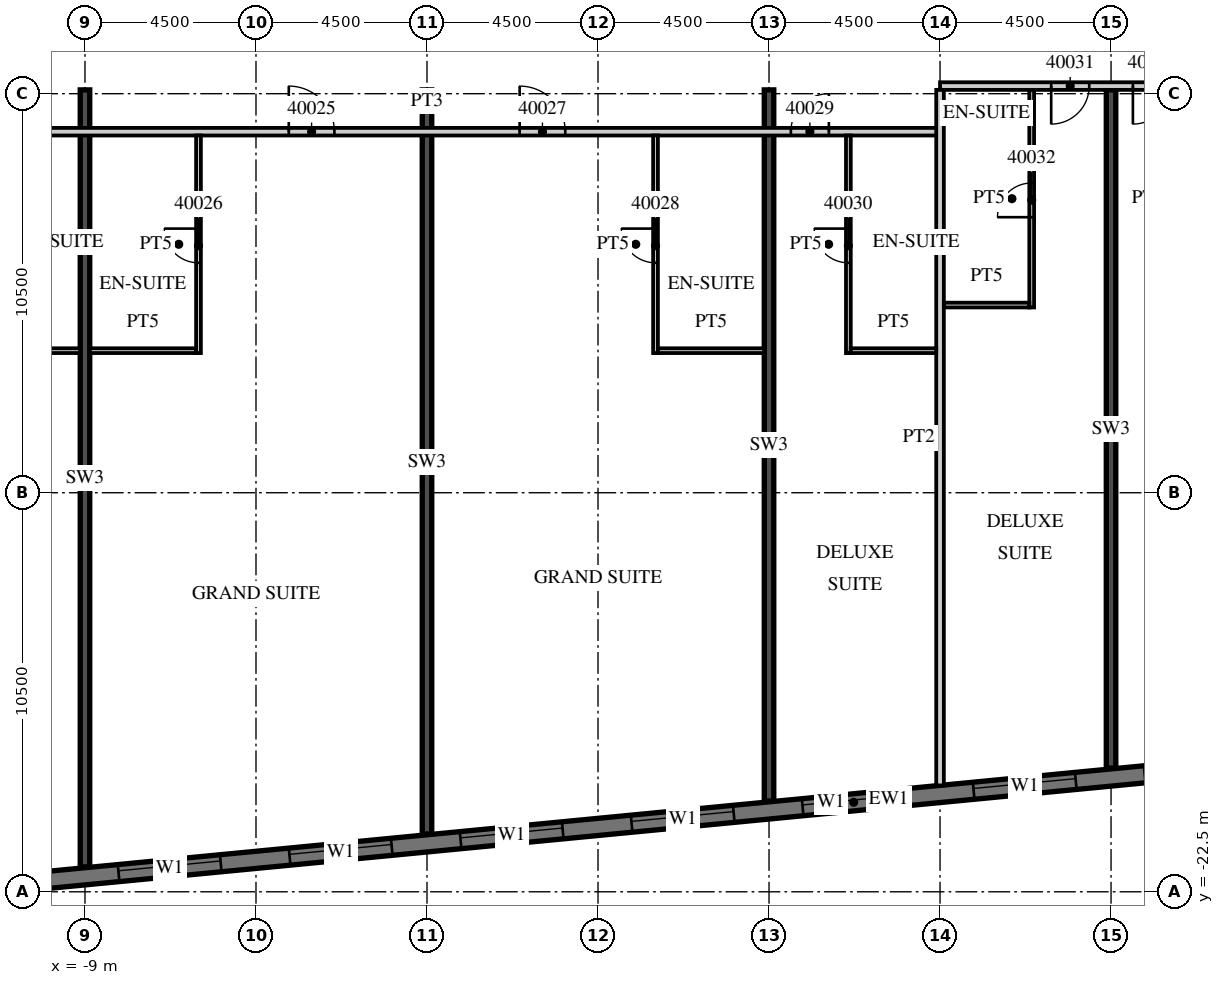
"""IFC4 building model, lengths in metres.
Left out: names, types, materials, properties, quantities, classifications, styles, units other than length and angle.
Written with IfcOpenShell. Run it as: python <this file> out.ifc"""

import sys

from ifc_helpers import new_model, si_unit, direction, frame, frame_2d, origin, place, context, subcontext, project, spatial, rectangle, extrude, element, fill, save


model = new_model("IFC4")
c1 = context("Model", 3, precision=1e-05, world=origin(), true_north=direction((0.0, 1.0)))
c2 = subcontext(c1, "Body", "Model", "MODEL_VIEW")
j1 = project(units=[si_unit("LENGTHUNIT", "METRE"), si_unit("PLANEANGLEUNIT", "RADIAN")], contexts=[c1])
p1 = place(None, origin())
s1 = spatial("IfcSite", under=j1, at=p1, CompositionType="ELEMENT")
p2 = place(p1, origin())
s2 = spatial("IfcBuilding", under=s1, at=p2, CompositionType="ELEMENT")
p3 = place(p2, frame((0.0, 0.0, 173.5)))
s3 = spatial("IfcBuildingStorey", under=s2, at=p3, CompositionType="ELEMENT", Elevation=173.5)
p4 = place(p3, frame((-9.0, -21.845, 0.0), z_axis=(0.0, 0.0, 1.0), x_axis=(0.0, 1.0, 0.0)))
e1 = element("IfcWall", 1, at=p4, inside=s3, PredefinedType="SHEAR", context=c2, shape_type="SweptSolid", body=[
    extrude(rectangle(XDim=20.445, YDim=0.25, at=frame_2d((10.223, 0.0))), origin(), (0.0, 0.0, 1.0), 3.3),
])
p5 = place(p3, frame((0.0, -20.979, 0.0), z_axis=(0.0, 0.0, 1.0), x_axis=(0.0, 1.0, 0.0)))
e2 = element("IfcWall", 2, at=p5, inside=s3, PredefinedType="SHEAR", context=c2, shape_type="SweptSolid", body=[
    extrude(rectangle(XDim=19.579, YDim=0.25, at=frame_2d((9.789, 0.0))), origin(), (0.0, 0.0, 1.0), 3.3),
])
p6 = place(p3, frame((9.0, -20.112, 0.0), z_axis=(0.0, 0.0, 1.0), x_axis=(0.0, 1.0, 0.0)))
e3 = element("IfcWall", 3, at=p6, inside=s3, PredefinedType="SHEAR", context=c2, shape_type="SweptSolid", body=[
    extrude(rectangle(XDim=18.712, YDim=0.25, at=frame_2d((9.356, 0.0))), origin(), (0.0, 0.0, 1.0), 3.3),
])
p7 = place(p3, frame((18.0, -19.245, 0.0), z_axis=(0.0, 0.0, 1.0), x_axis=(0.0, 1.0, 0.0)))
e4 = element("IfcWall", 4, at=p7, inside=s3, PredefinedType="SHEAR", context=c2, shape_type="SweptSolid", body=[
    extrude(rectangle(XDim=17.845, YDim=0.25, at=frame_2d((8.923, 0.0))), origin(), (0.0, 0.0, 1.0), 3.3),
])
p8 = place(p3, frame((-13.521, -22.529, 0.0), z_axis=(0.0, 0.0, 1.0), x_axis=(0.995396436651, 0.095843277819, 0.0)))
e5 = element("IfcWall", 5, at=p8, inside=s3, PredefinedType="SOLIDWALL", context=c2, shape_type="SweptSolid", body=[
    extrude(rectangle(XDim=51.578, YDim=0.45, at=frame_2d((25.789, 0.0))), origin(), (0.0, 0.0, 1.0), 3.02),
])
p9 = place(p8, frame((0.91, 0.0, 0.45)))
e6 = element("IfcOpeningElement", 6, at=p9, cuts=e5, PredefinedType="OPENING", context=c2, shape_type="SweptSolid", body=[
    extrude(rectangle(XDim=2.7, YDim=2.25, at=frame_2d((1.35, 1.125))), frame((0.0, 0.235, 0.0), z_axis=(0.0, -1.0, 0.0), x_axis=(1.0, 0.0, 0.0)), (0.0, 0.0, 1.0), 0.47),
])
p10 = place(p8, frame((5.431, 0.0, 0.45)))
e7 = element("IfcOpeningElement", 7, at=p10, cuts=e5, PredefinedType="OPENING", context=c2, shape_type="SweptSolid", body=[
    extrude(rectangle(XDim=2.7, YDim=2.25, at=frame_2d((1.35, 1.125))), frame((0.0, 0.235, 0.0), z_axis=(0.0, -1.0, 0.0), x_axis=(1.0, 0.0, 0.0)), (0.0, 0.0, 1.0), 0.47),
])
p11 = place(p8, frame((9.952, 0.0, 0.45)))
e8 = element("IfcOpeningElement", 8, at=p11, cuts=e5, PredefinedType="OPENING", context=c2, shape_type="SweptSolid", body=[
    extrude(rectangle(XDim=2.7, YDim=2.25, at=frame_2d((1.35, 1.125))), frame((0.0, 0.235, 0.0), z_axis=(0.0, -1.0, 0.0), x_axis=(1.0, 0.0, 0.0)), (0.0, 0.0, 1.0), 0.47),
])
p12 = place(p8, frame((14.473, 0.0, 0.45)))
e9 = element("IfcOpeningElement", 9, at=p12, cuts=e5, PredefinedType="OPENING", context=c2, shape_type="SweptSolid", body=[
    extrude(rectangle(XDim=2.7, YDim=2.25, at=frame_2d((1.35, 1.125))), frame((0.0, 0.235, 0.0), z_axis=(0.0, -1.0, 0.0), x_axis=(1.0, 0.0, 0.0)), (0.0, 0.0, 1.0), 0.47),
])
p13 = place(p8, frame((18.994, 0.0, 0.45)))
e10 = element("IfcOpeningElement", 10, at=p13, cuts=e5, PredefinedType="OPENING", context=c2, shape_type="SweptSolid", body=[
    extrude(rectangle(XDim=2.7, YDim=2.25, at=frame_2d((1.35, 1.125))), frame((0.0, 0.235, 0.0), z_axis=(0.0, -1.0, 0.0), x_axis=(1.0, 0.0, 0.0)), (0.0, 0.0, 1.0), 0.47),
])
p14 = place(p8, frame((23.514, 0.0, 0.45)))
e11 = element("IfcOpeningElement", 11, at=p14, cuts=e5, PredefinedType="OPENING", context=c2, shape_type="SweptSolid", body=[
    extrude(rectangle(XDim=2.7, YDim=2.25, at=frame_2d((1.35, 1.125))), frame((0.0, 0.235, 0.0), z_axis=(0.0, -1.0, 0.0), x_axis=(1.0, 0.0, 0.0)), (0.0, 0.0, 1.0), 0.47),
])
p15 = place(p8, frame((28.035, 0.0, 0.45)))
e12 = element("IfcOpeningElement", 12, at=p15, cuts=e5, PredefinedType="OPENING", context=c2, shape_type="SweptSolid", body=[
    extrude(rectangle(XDim=2.7, YDim=2.25, at=frame_2d((1.35, 1.125))), frame((0.0, 0.235, 0.0), z_axis=(0.0, -1.0, 0.0), x_axis=(1.0, 0.0, 0.0)), (0.0, 0.0, 1.0), 0.47),
])
p16 = place(p8, frame((32.556, 0.0, 0.45)))
e13 = element("IfcOpeningElement", 13, at=p16, cuts=e5, PredefinedType="OPENING", context=c2, shape_type="SweptSolid", body=[
    extrude(rectangle(XDim=2.7, YDim=2.25, at=frame_2d((1.35, 1.125))), frame((0.0, 0.235, 0.0), z_axis=(0.0, -1.0, 0.0), x_axis=(1.0, 0.0, 0.0)), (0.0, 0.0, 1.0), 0.47),
])
p17 = place(p8, frame((37.077, 0.0, 0.45)))
e14 = element("IfcOpeningElement", 14, at=p17, cuts=e5, PredefinedType="OPENING", context=c2, shape_type="SweptSolid", body=[
    extrude(rectangle(XDim=2.7, YDim=2.25, at=frame_2d((1.35, 1.125))), frame((0.0, 0.235, 0.0), z_axis=(0.0, -1.0, 0.0), x_axis=(1.0, 0.0, 0.0)), (0.0, 0.0, 1.0), 0.47),
])
p18 = place(p8, frame((41.598, 0.0, 0.45)))
e15 = element("IfcOpeningElement", 15, at=p18, cuts=e5, PredefinedType="OPENING", context=c2, shape_type="SweptSolid", body=[
    extrude(rectangle(XDim=2.7, YDim=2.25, at=frame_2d((1.35, 1.125))), frame((0.0, 0.235, 0.0), z_axis=(0.0, -1.0, 0.0), x_axis=(1.0, 0.0, 0.0)), (0.0, 0.0, 1.0), 0.47),
])
p19 = place(p8, frame((46.119, 0.0, 0.45)))
e16 = element("IfcOpeningElement", 16, at=p19, cuts=e5, PredefinedType="OPENING", context=c2, shape_type="SweptSolid", body=[
    extrude(rectangle(XDim=2.7, YDim=2.25, at=frame_2d((1.35, 1.125))), frame((0.0, 0.235, 0.0), z_axis=(0.0, -1.0, 0.0), x_axis=(1.0, 0.0, 0.0)), (0.0, 0.0, 1.0), 0.47),
])
p20 = place(p3, frame((-13.5, -2.5, 0.0), z_axis=(0.0, 0.0, 1.0), x_axis=(1.0, 0.0, 0.0)))
e17 = element("IfcWall", 17, at=p20, inside=s3, PredefinedType="PARTITIONING", context=c2, shape_type="SweptSolid", body=[
    extrude(rectangle(XDim=27.0, YDim=0.2, at=frame_2d((13.5, 0.0))), origin(), (0.0, 0.0, 1.0), 3.02),
])
p21 = place(p20, frame((0.575, 0.0, 0.0)))
e18 = element("IfcOpeningElement", 18, at=p21, cuts=e17, PredefinedType="OPENING", context=c2, shape_type="SweptSolid", body=[
    extrude(rectangle(XDim=1.0, YDim=2.1, at=frame_2d((0.5, 1.05))), frame((0.0, 0.11, 0.0), z_axis=(0.0, -1.0, 0.0), x_axis=(1.0, 0.0, 0.0)), (0.0, 0.0, 1.0), 0.22),
])
p22 = place(p20, frame((9.863, 0.0, 0.0)))
e19 = element("IfcOpeningElement", 19, at=p22, cuts=e17, PredefinedType="OPENING", context=c2, shape_type="SweptSolid", body=[
    extrude(rectangle(XDim=1.2, YDim=2.1, at=frame_2d((0.6, 1.05))), frame((0.0, 0.11, 0.0), z_axis=(0.0, -1.0, 0.0), x_axis=(1.0, 0.0, 0.0)), (0.0, 0.0, 1.0), 0.22),
])
p23 = place(p20, frame((15.938, 0.0, 0.0)))
e20 = element("IfcOpeningElement", 20, at=p23, cuts=e17, PredefinedType="OPENING", context=c2, shape_type="SweptSolid", body=[
    extrude(rectangle(XDim=1.2, YDim=2.1, at=frame_2d((0.6, 1.05))), frame((0.0, 0.11, 0.0), z_axis=(0.0, -1.0, 0.0), x_axis=(1.0, 0.0, 0.0)), (0.0, 0.0, 1.0), 0.22),
])
p24 = place(p20, frame((23.075, 0.0, 0.0)))
e21 = element("IfcOpeningElement", 21, at=p24, cuts=e17, PredefinedType="OPENING", context=c2, shape_type="SweptSolid", body=[
    extrude(rectangle(XDim=1.0, YDim=2.1, at=frame_2d((0.5, 1.05))), frame((0.0, 0.11, 0.0), z_axis=(0.0, -1.0, 0.0), x_axis=(1.0, 0.0, 0.0)), (0.0, 0.0, 1.0), 0.22),
])
p25 = place(p3, frame((13.5, -1.3, 0.0), z_axis=(0.0, 0.0, 1.0), x_axis=(1.0, 0.0, 0.0)))
e22 = element("IfcWall", 22, at=p25, inside=s3, PredefinedType="PARTITIONING", context=c2, shape_type="SweptSolid", body=[
    extrude(rectangle(XDim=26.317, YDim=0.2, at=frame_2d((13.158, 0.0))), origin(), (0.0, 0.0, 1.0), 3.02),
])
p26 = place(p25, frame((2.925, 0.0, 0.0)))
e23 = element("IfcOpeningElement", 23, at=p26, cuts=e22, PredefinedType="OPENING", context=c2, shape_type="SweptSolid", body=[
    extrude(rectangle(XDim=1.0, YDim=2.1, at=frame_2d((0.5, 1.05))), frame((0.0, 0.11, 0.0), z_axis=(0.0, -1.0, 0.0), x_axis=(1.0, 0.0, 0.0)), (0.0, 0.0, 1.0), 0.22),
])
p27 = place(p25, frame((5.075, 0.0, 0.0)))
e24 = element("IfcOpeningElement", 24, at=p27, cuts=e22, PredefinedType="OPENING", context=c2, shape_type="SweptSolid", body=[
    extrude(rectangle(XDim=1.0, YDim=2.1, at=frame_2d((0.5, 1.05))), frame((0.0, 0.11, 0.0), z_axis=(0.0, -1.0, 0.0), x_axis=(1.0, 0.0, 0.0)), (0.0, 0.0, 1.0), 0.22),
])
p28 = place(p25, frame((9.55, 0.0, 0.0)))
e25 = element("IfcOpeningElement", 25, at=p28, cuts=e22, PredefinedType="OPENING", context=c2, shape_type="SweptSolid", body=[
    extrude(rectangle(XDim=1.0, YDim=2.1, at=frame_2d((0.5, 1.05))), frame((0.0, 0.11, 0.0), z_axis=(0.0, -1.0, 0.0), x_axis=(1.0, 0.0, 0.0)), (0.0, 0.0, 1.0), 0.22),
])
p29 = place(p25, frame((18.862, 0.0, 0.0)))
e26 = element("IfcOpeningElement", 26, at=p29, cuts=e22, PredefinedType="OPENING", context=c2, shape_type="SweptSolid", body=[
    extrude(rectangle(XDim=1.2, YDim=2.1, at=frame_2d((0.6, 1.05))), frame((0.0, 0.11, 0.0), z_axis=(0.0, -1.0, 0.0), x_axis=(1.0, 0.0, 0.0)), (0.0, 0.0, 1.0), 0.22),
])
p30 = place(p25, frame((25.208, 0.0, 0.0)))
e27 = element("IfcOpeningElement", 27, at=p30, cuts=e22, PredefinedType="OPENING", context=c2, shape_type="SweptSolid", body=[
    extrude(rectangle(XDim=0.9, YDim=2.1, at=frame_2d((0.45, 1.05))), frame((0.0, 0.11, 0.0), z_axis=(0.0, -1.0, 0.0), x_axis=(1.0, 0.0, 0.0)), (0.0, 0.0, 1.0), 0.22),
])
p31 = place(p3, frame((-11.375, -8.262, 0.0), z_axis=(0.0, 0.0, 1.0), x_axis=(1.0, 0.0, 0.0)))
e28 = element("IfcWall", 28, at=p31, inside=s3, PredefinedType="PARTITIONING", context=c2, shape_type="SweptSolid", body=[
    extrude(rectangle(XDim=2.25, YDim=0.125, at=frame_2d((1.125, 0.0))), origin(), (0.0, 0.0, 1.0), 3.02),
])
p32 = place(p3, frame((-6.013, -8.325, 0.0), z_axis=(0.0, 0.0, 1.0), x_axis=(0.0, 1.0, 0.0)))
e29 = element("IfcWall", 29, at=p32, inside=s3, PredefinedType="PARTITIONING", context=c2, shape_type="SweptSolid", body=[
    extrude(rectangle(XDim=5.725, YDim=0.125, at=frame_2d((2.862, 0.0))), origin(), (0.0, 0.0, 1.0), 3.02),
])
p33 = place(p32, frame((2.375, 0.0, 0.0)))
e30 = element("IfcOpeningElement", 30, at=p33, cuts=e29, PredefinedType="OPENING", context=c2, shape_type="SweptSolid", body=[
    extrude(rectangle(XDim=0.9, YDim=2.1, at=frame_2d((0.45, 1.05))), frame((0.0, 0.073, 0.0), z_axis=(0.0, -1.0, 0.0), x_axis=(1.0, 0.0, 0.0)), (0.0, 0.0, 1.0), 0.145),
])
p34 = place(p3, frame((-8.875, -8.262, 0.0), z_axis=(0.0, 0.0, 1.0), x_axis=(1.0, 0.0, 0.0)))
e31 = element("IfcWall", 31, at=p34, inside=s3, PredefinedType="PARTITIONING", context=c2, shape_type="SweptSolid", body=[
    extrude(rectangle(XDim=2.8, YDim=0.125, at=frame_2d((1.4, 0.0))), origin(), (0.0, 0.0, 1.0), 3.02),
])
p35 = place(p3, frame((6.013, -8.325, 0.0), z_axis=(0.0, 0.0, 1.0), x_axis=(0.0, 1.0, 0.0)))
e32 = element("IfcWall", 32, at=p35, inside=s3, PredefinedType="PARTITIONING", context=c2, shape_type="SweptSolid", body=[
    extrude(rectangle(XDim=5.725, YDim=0.125, at=frame_2d((2.862, 0.0))), origin(), (0.0, 0.0, 1.0), 3.02),
])
p36 = place(p35, frame((2.375, 0.0, 0.0)))
e33 = element("IfcOpeningElement", 33, at=p36, cuts=e32, PredefinedType="OPENING", context=c2, shape_type="SweptSolid", body=[
    extrude(rectangle(XDim=0.9, YDim=2.1, at=frame_2d((0.45, 1.05))), frame((0.0, 0.073, 0.0), z_axis=(0.0, -1.0, 0.0), x_axis=(1.0, 0.0, 0.0)), (0.0, 0.0, 1.0), 0.145),
])
p37 = place(p3, frame((6.075, -8.262, 0.0), z_axis=(0.0, 0.0, 1.0), x_axis=(1.0, 0.0, 0.0)))
e34 = element("IfcWall", 34, at=p37, inside=s3, PredefinedType="PARTITIONING", context=c2, shape_type="SweptSolid", body=[
    extrude(rectangle(XDim=2.8, YDim=0.125, at=frame_2d((1.4, 0.0))), origin(), (0.0, 0.0, 1.0), 3.02),
])
p38 = place(p3, frame((13.5, -19.701, 0.0), z_axis=(0.0, 0.0, 1.0), x_axis=(0.0, 1.0, 0.0)))
e35 = element("IfcWall", 35, at=p38, inside=s3, PredefinedType="PARTITIONING", context=c2, shape_type="SweptSolid", body=[
    extrude(rectangle(XDim=18.301, YDim=0.2, at=frame_2d((9.15, 0.0))), origin(), (0.0, 0.0, 1.0), 3.02),
])
p39 = place(p3, frame((11.088, -8.325, 0.0), z_axis=(0.0, 0.0, 1.0), x_axis=(0.0, 1.0, 0.0)))
e36 = element("IfcWall", 36, at=p39, inside=s3, PredefinedType="PARTITIONING", context=c2, shape_type="SweptSolid", body=[
    extrude(rectangle(XDim=5.725, YDim=0.125, at=frame_2d((2.862, 0.0))), origin(), (0.0, 0.0, 1.0), 3.02),
])
p40 = place(p39, frame((2.375, 0.0, 0.0)))
e37 = element("IfcOpeningElement", 37, at=p40, cuts=e36, PredefinedType="OPENING", context=c2, shape_type="SweptSolid", body=[
    extrude(rectangle(XDim=0.9, YDim=2.1, at=frame_2d((0.45, 1.05))), frame((0.0, 0.073, 0.0), z_axis=(0.0, -1.0, 0.0), x_axis=(1.0, 0.0, 0.0)), (0.0, 0.0, 1.0), 0.145),
])
p41 = place(p3, frame((11.15, -8.262, 0.0), z_axis=(0.0, 0.0, 1.0), x_axis=(1.0, 0.0, 0.0)))
e38 = element("IfcWall", 38, at=p41, inside=s3, PredefinedType="PARTITIONING", context=c2, shape_type="SweptSolid", body=[
    extrude(rectangle(XDim=2.25, YDim=0.125, at=frame_2d((1.125, 0.0))), origin(), (0.0, 0.0, 1.0), 3.02),
])
p42 = place(p3, frame((15.912, -7.125, 0.0), z_axis=(0.0, 0.0, 1.0), x_axis=(0.0, 1.0, 0.0)))
e39 = element("IfcWall", 39, at=p42, inside=s3, PredefinedType="PARTITIONING", context=c2, shape_type="SweptSolid", body=[
    extrude(rectangle(XDim=5.725, YDim=0.125, at=frame_2d((2.863, 0.0))), origin(), (0.0, 0.0, 1.0), 3.02),
])
p43 = place(p42, frame((2.375, 0.0, 0.0)))
e40 = element("IfcOpeningElement", 40, at=p43, cuts=e39, PredefinedType="OPENING", context=c2, shape_type="SweptSolid", body=[
    extrude(rectangle(XDim=0.9, YDim=2.1, at=frame_2d((0.45, 1.05))), frame((0.0, 0.073, 0.0), z_axis=(0.0, -1.0, 0.0), x_axis=(1.0, 0.0, 0.0)), (0.0, 0.0, 1.0), 0.145),
])
p44 = place(p3, frame((13.6, -7.062, 0.0), z_axis=(0.0, 0.0, 1.0), x_axis=(1.0, 0.0, 0.0)))
e41 = element("IfcWall", 41, at=p44, inside=s3, PredefinedType="PARTITIONING", context=c2, shape_type="SweptSolid", body=[
    extrude(rectangle(XDim=2.25, YDim=0.125, at=frame_2d((1.125, 0.0))), origin(), (0.0, 0.0, 1.0), 3.02),
])
p45 = place(p10, origin())
e42 = element("IfcWindow", 42, at=p45, inside=s3, PartitioningType="SINGLE_PANEL", PredefinedType="WINDOW", context=c2, shape_type="SweptSolid", body=[
    extrude(rectangle(XDim=2.7, YDim=2.25, at=frame_2d((1.35, 1.125))), frame((0.0, 0.09, 0.0), z_axis=(0.0, -1.0, 0.0), x_axis=(1.0, 0.0, 0.0)), (0.0, 0.0, 1.0), 0.06),
])
fill(e7, e42)
p46 = place(p11, origin())
e43 = element("IfcWindow", 43, at=p46, inside=s3, PartitioningType="SINGLE_PANEL", PredefinedType="WINDOW", context=c2, shape_type="SweptSolid", body=[
    extrude(rectangle(XDim=2.7, YDim=2.25, at=frame_2d((1.35, 1.125))), frame((0.0, 0.09, 0.0), z_axis=(0.0, -1.0, 0.0), x_axis=(1.0, 0.0, 0.0)), (0.0, 0.0, 1.0), 0.06),
])
fill(e8, e43)
p47 = place(p12, origin())
e44 = element("IfcWindow", 44, at=p47, inside=s3, PartitioningType="SINGLE_PANEL", PredefinedType="WINDOW", context=c2, shape_type="SweptSolid", body=[
    extrude(rectangle(XDim=2.7, YDim=2.25, at=frame_2d((1.35, 1.125))), frame((0.0, 0.09, 0.0), z_axis=(0.0, -1.0, 0.0), x_axis=(1.0, 0.0, 0.0)), (0.0, 0.0, 1.0), 0.06),
])
fill(e9, e44)
p48 = place(p13, origin())
e45 = element("IfcWindow", 45, at=p48, inside=s3, PartitioningType="SINGLE_PANEL", PredefinedType="WINDOW", context=c2, shape_type="SweptSolid", body=[
    extrude(rectangle(XDim=2.7, YDim=2.25, at=frame_2d((1.35, 1.125))), frame((0.0, 0.09, 0.0), z_axis=(0.0, -1.0, 0.0), x_axis=(1.0, 0.0, 0.0)), (0.0, 0.0, 1.0), 0.06),
])
fill(e10, e45)
p49 = place(p14, origin())
e46 = element("IfcWindow", 46, at=p49, inside=s3, PartitioningType="SINGLE_PANEL", PredefinedType="WINDOW", context=c2, shape_type="SweptSolid", body=[
    extrude(rectangle(XDim=2.7, YDim=2.25, at=frame_2d((1.35, 1.125))), frame((0.0, 0.09, 0.0), z_axis=(0.0, -1.0, 0.0), x_axis=(1.0, 0.0, 0.0)), (0.0, 0.0, 1.0), 0.06),
])
fill(e11, e46)
p50 = place(p15, origin())
e47 = element("IfcWindow", 47, at=p50, inside=s3, PartitioningType="SINGLE_PANEL", PredefinedType="WINDOW", context=c2, shape_type="SweptSolid", body=[
    extrude(rectangle(XDim=2.7, YDim=2.25, at=frame_2d((1.35, 1.125))), frame((0.0, 0.09, 0.0), z_axis=(0.0, -1.0, 0.0), x_axis=(1.0, 0.0, 0.0)), (0.0, 0.0, 1.0), 0.06),
])
fill(e12, e47)
p51 = place(p22, origin())
e48 = element("IfcDoor", 48, at=p51, inside=s3, OperationType="SINGLE_SWING_LEFT", PredefinedType="DOOR", context=c2, shape_type="SweptSolid", body=[
    extrude(rectangle(XDim=1.2, YDim=2.1, at=frame_2d((0.6, 1.05))), frame((0.0, 0.025, 0.0), z_axis=(0.0, -1.0, 0.0), x_axis=(1.0, 0.0, 0.0)), (0.0, 0.0, 1.0), 0.05),
])
fill(e19, e48)
p52 = place(p33, origin())
e49 = element("IfcDoor", 49, at=p52, inside=s3, OperationType="SINGLE_SWING_RIGHT", PredefinedType="DOOR", context=c2, shape_type="SweptSolid", body=[
    extrude(rectangle(XDim=0.9, YDim=2.1, at=frame_2d((0.45, 1.05))), frame((0.0, 0.025, 0.0), z_axis=(0.0, -1.0, 0.0), x_axis=(1.0, 0.0, 0.0)), (0.0, 0.0, 1.0), 0.05),
])
fill(e30, e49)
p53 = place(p23, origin())
e50 = element("IfcDoor", 50, at=p53, inside=s3, OperationType="SINGLE_SWING_LEFT", PredefinedType="DOOR", context=c2, shape_type="SweptSolid", body=[
    extrude(rectangle(XDim=1.2, YDim=2.1, at=frame_2d((0.6, 1.05))), frame((0.0, 0.025, 0.0), z_axis=(0.0, -1.0, 0.0), x_axis=(1.0, 0.0, 0.0)), (0.0, 0.0, 1.0), 0.05),
])
fill(e20, e50)
p54 = place(p36, origin())
e51 = element("IfcDoor", 51, at=p54, inside=s3, OperationType="SINGLE_SWING_RIGHT", PredefinedType="DOOR", context=c2, shape_type="SweptSolid", body=[
    extrude(rectangle(XDim=0.9, YDim=2.1, at=frame_2d((0.45, 1.05))), frame((0.0, 0.025, 0.0), z_axis=(0.0, -1.0, 0.0), x_axis=(1.0, 0.0, 0.0)), (0.0, 0.0, 1.0), 0.05),
])
fill(e33, e51)
p55 = place(p24, origin())
e52 = element("IfcDoor", 52, at=p55, inside=s3, OperationType="SINGLE_SWING_RIGHT", PredefinedType="DOOR", context=c2, shape_type="SweptSolid", body=[
    extrude(rectangle(XDim=1.0, YDim=2.1, at=frame_2d((0.5, 1.05))), frame((0.0, 0.025, 0.0), z_axis=(0.0, -1.0, 0.0), x_axis=(1.0, 0.0, 0.0)), (0.0, 0.0, 1.0), 0.05),
])
fill(e21, e52)
p56 = place(p40, origin())
e53 = element("IfcDoor", 53, at=p56, inside=s3, OperationType="SINGLE_SWING_RIGHT", PredefinedType="DOOR", context=c2, shape_type="SweptSolid", body=[
    extrude(rectangle(XDim=0.9, YDim=2.1, at=frame_2d((0.45, 1.05))), frame((0.0, 0.025, 0.0), z_axis=(0.0, -1.0, 0.0), x_axis=(1.0, 0.0, 0.0)), (0.0, 0.0, 1.0), 0.05),
])
fill(e37, e53)
p57 = place(p26, origin())
e54 = element("IfcDoor", 54, at=p57, inside=s3, OperationType="SINGLE_SWING_LEFT", PredefinedType="DOOR", context=c2, shape_type="SweptSolid", body=[
    extrude(rectangle(XDim=1.0, YDim=2.1, at=frame_2d((0.5, 1.05))), frame((0.0, 0.025, 0.0), z_axis=(0.0, -1.0, 0.0), x_axis=(1.0, 0.0, 0.0)), (0.0, 0.0, 1.0), 0.05),
])
fill(e23, e54)
p58 = place(p43, origin())
e55 = element("IfcDoor", 55, at=p58, inside=s3, OperationType="SINGLE_SWING_LEFT", PredefinedType="DOOR", context=c2, shape_type="SweptSolid", body=[
    extrude(rectangle(XDim=0.9, YDim=2.1, at=frame_2d((0.45, 1.05))), frame((0.0, 0.025, 0.0), z_axis=(0.0, -1.0, 0.0), x_axis=(1.0, 0.0, 0.0)), (0.0, 0.0, 1.0), 0.05),
])
fill(e40, e55)
p59 = place(p27, origin())
e56 = element("IfcDoor", 56, at=p59, inside=s3, OperationType="SINGLE_SWING_LEFT", PredefinedType="DOOR", context=c2, shape_type="SweptSolid", body=[
    extrude(rectangle(XDim=1.0, YDim=2.1, at=frame_2d((0.5, 1.05))), frame((0.0, 0.025, 0.0), z_axis=(0.0, -1.0, 0.0), x_axis=(1.0, 0.0, 0.0)), (0.0, 0.0, 1.0), 0.05),
])
fill(e24, e56)
save(model, sys.argv[1])
